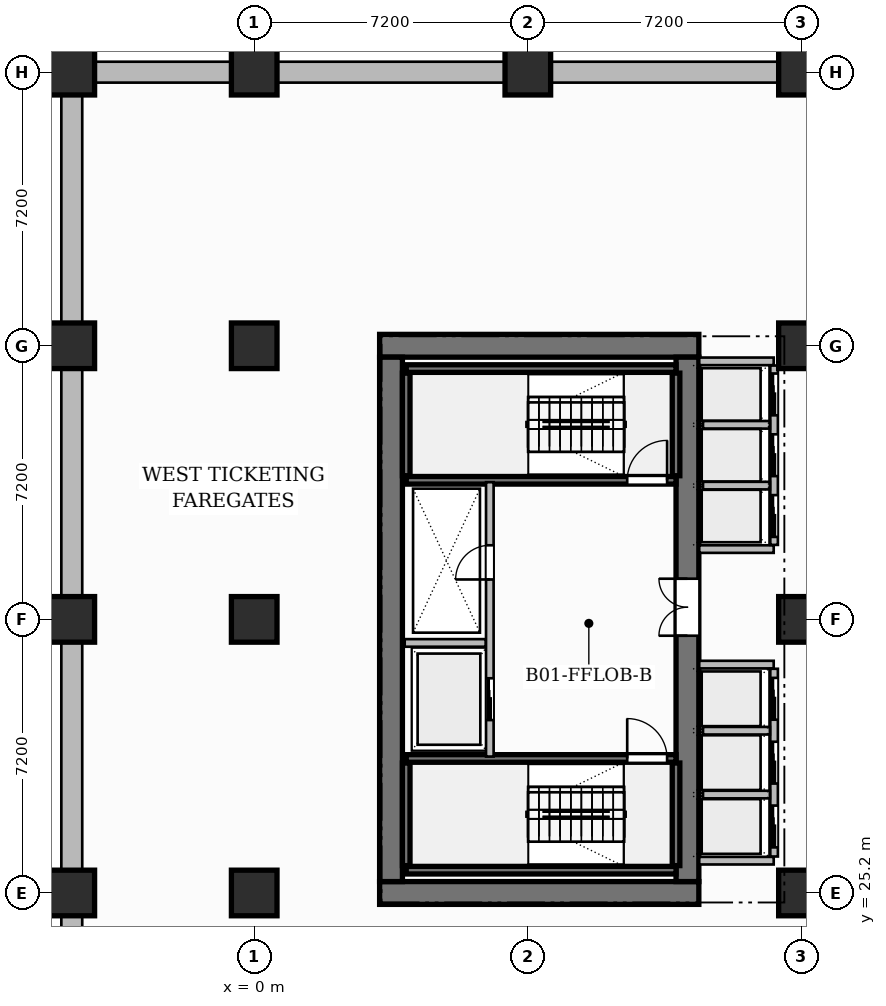
"""IFC4 building model, lengths in metres.
Left out: names, types, materials, properties, quantities, classifications, styles, units other than length and angle.
Written with IfcOpenShell. Run it as: python <this file> out.ifc"""

import sys

from ifc_helpers import new_model, si_unit, direction, frame, frame_2d, origin, origin_2d, place, context, subcontext, project, spatial, rectangle, extrude, source, transform, mapped, element, fill, save


model = new_model("IFC4")
c1 = context("Model", 3, precision=1e-05, world=origin(), true_north=direction((0.0, 1.0)))
c2 = subcontext(c1, "Body", "Model", "MODEL_VIEW")
j1 = project(units=[si_unit("LENGTHUNIT", "METRE"), si_unit("PLANEANGLEUNIT", "RADIAN")], contexts=[c1])
p1 = place(None, origin())
s1 = spatial("IfcSite", under=j1, at=p1, CompositionType="ELEMENT")
p2 = place(p1, origin())
s2 = spatial("IfcBuilding", under=s1, at=p2, CompositionType="ELEMENT")
p3 = place(p2, frame((0.0, 0.0, -6.5)))
s3 = spatial("IfcBuildingStorey", under=s2, at=p3, CompositionType="ELEMENT", Elevation=-6.5)
p4 = place(p3, frame((80.4, 46.8, 0.0), z_axis=(0.0, 0.0, 1.0), x_axis=(-1.0, 0.0, 0.0)))
e1 = element("IfcWall", 1, at=p4, inside=s3, PredefinedType="USERDEFINED", context=c2, shape_type="SweptSolid", body=[
    extrude(rectangle(XDim=85.2, YDim=0.55, at=frame_2d((42.6, 0.0))), origin(), (0.0, 0.0, 1.0), 6.5),
])
p5 = place(p3, frame((-4.8, 46.45, 0.0), z_axis=(0.0, 0.0, 1.0), x_axis=(0.0, -1.0, 0.0)))
e2 = element("IfcWall", 2, at=p5, inside=s3, PredefinedType="USERDEFINED", context=c2, shape_type="SweptSolid", body=[
    extrude(rectangle(XDim=46.1, YDim=0.55, at=frame_2d((23.05, 0.0))), origin(), (0.0, 0.0, 1.0), 6.5),
])
for number, where, z_axis, x_axis in (
    (3, (3.3, 25.2, 0.0), (0.0, 0.0, 1.0), (1.0, 0.0, 0.0)),
    (4, (3.3, 39.6, 0.0), (0.0, 0.0, 1.0), (1.0, 0.0, 0.0)),
):
    element("IfcWall", number, at=place(p3, frame(where, z_axis=z_axis, x_axis=x_axis)), inside=s3, PredefinedType="SHEAR", context=c2, shape_type="SweptSolid", body=[
        extrude(rectangle(XDim=8.4, YDim=0.6, at=frame_2d((4.2, 0.0))), origin(), (0.0, 0.0, 1.0), 6.5),
    ])
p6 = place(p3, frame((3.6, 25.5, 0.0), z_axis=(0.0, 0.0, 1.0), x_axis=(0.0, 1.0, 0.0)))
e5 = element("IfcWall", 5, at=p6, inside=s3, PredefinedType="SHEAR", context=c2, shape_type="SweptSolid", body=[
    extrude(rectangle(XDim=13.8, YDim=0.6, at=frame_2d((6.9, 0.0))), origin(), (0.0, 0.0, 1.0), 6.5),
])
p7 = place(p3, frame((11.4, 25.5, 0.0), z_axis=(0.0, 0.0, 1.0), x_axis=(0.0, 1.0, 0.0)))
e6 = element("IfcWall", 6, at=p7, inside=s3, PredefinedType="SHEAR", context=c2, shape_type="SweptSolid", body=[
    extrude(rectangle(XDim=13.8, YDim=0.6, at=frame_2d((6.9, 0.0))), origin(), (0.0, 0.0, 1.0), 6.5),
])
p8 = place(p7, frame((6.47, 0.0, 0.0)))
e7 = element("IfcOpeningElement", 7, at=p8, cuts=e6, PredefinedType="OPENING", context=c2, shape_type="SweptSolid", body=[
    extrude(rectangle(XDim=1.5, YDim=2.2, at=frame_2d((0.75, 1.1))), frame((0.0, 0.31, 0.0), z_axis=(0.0, -1.0, 0.0), x_axis=(1.0, 0.0, 0.0)), (0.0, 0.0, 1.0), 0.62),
])
m1 = source(origin(), c2, "Body", "SweptSolid", [
    extrude(rectangle(XDim=1.2, YDim=1.2, at=origin_2d()), origin(), (0.0, 0.0, 1.0), 6.5),
])
for number, where, z_axis, x_axis in (
    (8, (-4.8, 25.2, 0.0), (0.0, 0.0, 1.0), (1.0, 0.0, 0.0)),
    (9, (-4.8, 32.4, 0.0), (0.0, 0.0, 1.0), (1.0, 0.0, 0.0)),
    (10, (-4.8, 39.6, 0.0), (0.0, 0.0, 1.0), (1.0, 0.0, 0.0)),
    (11, (-4.8, 46.8, 0.0), (0.0, 0.0, 1.0), (1.0, 0.0, 0.0)),
    (12, (0.0, 25.2, 0.0), (0.0, 0.0, 1.0), (1.0, 0.0, 0.0)),
    (13, (0.0, 32.4, 0.0), (0.0, 0.0, 1.0), (1.0, 0.0, 0.0)),
    (14, (0.0, 39.6, 0.0), (0.0, 0.0, 1.0), (1.0, 0.0, 0.0)),
    (15, (0.0, 46.8, 0.0), (0.0, 0.0, 1.0), (1.0, 0.0, 0.0)),
    (16, (7.2, 46.8, 0.0), (0.0, 0.0, 1.0), (1.0, 0.0, 0.0)),
    (17, (14.4, 25.2, 0.0), (0.0, 0.0, 1.0), (1.0, 0.0, 0.0)),
    (18, (14.4, 32.4, 0.0), (0.0, 0.0, 1.0), (1.0, 0.0, 0.0)),
    (19, (14.4, 39.6, 0.0), (0.0, 0.0, 1.0), (1.0, 0.0, 0.0)),
    (20, (14.4, 46.8, 0.0), (0.0, 0.0, 1.0), (1.0, 0.0, 0.0)),
):
    element("IfcColumn", number, at=place(p3, frame(where, z_axis=z_axis, x_axis=x_axis)), inside=s3, PredefinedType="COLUMN", context=c2, shape_type="MappedRepresentation", body=[
        mapped(m1, transform((0.0, 0.0, 0.0), scale=1.0)),
    ])
p9 = place(p3, frame((4.0, 25.8, 0.0), z_axis=(0.0, 0.0, 1.0), x_axis=(1.0, 0.0, 0.0)))
e21 = element("IfcWall", 21, at=p9, inside=s3, PredefinedType="SHEAR", context=c2, shape_type="SweptSolid", body=[
    extrude(rectangle(XDim=7.1, YDim=0.2, at=frame_2d((3.55, 0.0))), origin(), (0.0, 0.0, 1.0), 6.5),
])
for number, where, z_axis, x_axis in (
    (22, (4.0, 25.92, 0.0), (0.0, 0.0, 1.0), (0.0, 1.0, 0.0)),
    (23, (11.1, 25.92, 0.0), (0.0, 0.0, 1.0), (0.0, 1.0, 0.0)),
):
    element("IfcWall", number, at=place(p3, frame(where, z_axis=z_axis, x_axis=x_axis)), inside=s3, PredefinedType="SHEAR", context=c2, shape_type="SweptSolid", body=[
        extrude(rectangle(XDim=2.7, YDim=0.2, at=frame_2d((1.35, 0.0))), origin(), (0.0, 0.0, 1.0), 6.5),
    ])
p10 = place(p3, frame((4.0, 28.74, 0.0), z_axis=(0.0, 0.0, 1.0), x_axis=(1.0, 0.0, 0.0)))
e24 = element("IfcWall", 24, at=p10, inside=s3, PredefinedType="SHEAR", context=c2, shape_type="SweptSolid", body=[
    extrude(rectangle(XDim=7.1, YDim=0.2, at=frame_2d((3.55, 0.0))), origin(), (0.0, 0.0, 1.0), 6.5),
])
p11 = place(p10, frame((5.815, 0.0, 0.0)))
e25 = element("IfcOpeningElement", 25, at=p11, cuts=e24, PredefinedType="OPENING", context=c2, shape_type="SweptSolid", body=[
    extrude(rectangle(XDim=1.05, YDim=2.2, at=frame_2d((0.525, 1.1))), frame((0.0, 0.11, 0.0), z_axis=(0.0, -1.0, 0.0), x_axis=(1.0, 0.0, 0.0)), (0.0, 0.0, 1.0), 0.22),
])
p12 = place(p3, frame((4.0, 39.0, 0.0), z_axis=(0.0, 0.0, 1.0), x_axis=(1.0, 0.0, 0.0)))
e26 = element("IfcWall", 26, at=p12, inside=s3, PredefinedType="SHEAR", context=c2, shape_type="SweptSolid", body=[
    extrude(rectangle(XDim=7.1, YDim=0.2, at=frame_2d((3.55, 0.0))), origin(), (0.0, 0.0, 1.0), 6.5),
])
for number, where, z_axis, x_axis in (
    (27, (4.0, 36.18, 0.0), (0.0, 0.0, 1.0), (0.0, 1.0, 0.0)),
    (28, (11.1, 36.18, 0.0), (0.0, 0.0, 1.0), (0.0, 1.0, 0.0)),
):
    element("IfcWall", number, at=place(p3, frame(where, z_axis=z_axis, x_axis=x_axis)), inside=s3, PredefinedType="SHEAR", context=c2, shape_type="SweptSolid", body=[
        extrude(rectangle(XDim=2.7, YDim=0.2, at=frame_2d((1.35, 0.0))), origin(), (0.0, 0.0, 1.0), 6.5),
    ])
p13 = place(p3, frame((4.0, 36.06, 0.0), z_axis=(0.0, 0.0, 1.0), x_axis=(1.0, 0.0, 0.0)))
e29 = element("IfcWall", 29, at=p13, inside=s3, PredefinedType="SHEAR", context=c2, shape_type="SweptSolid", body=[
    extrude(rectangle(XDim=7.1, YDim=0.2, at=frame_2d((3.55, 0.0))), origin(), (0.0, 0.0, 1.0), 6.5),
])
p14 = place(p13, frame((5.815, 0.0, 0.0)))
e30 = element("IfcOpeningElement", 30, at=p14, cuts=e29, PredefinedType="OPENING", context=c2, shape_type="SweptSolid", body=[
    extrude(rectangle(XDim=1.05, YDim=2.2, at=frame_2d((0.525, 1.1))), frame((0.0, 0.11, 0.0), z_axis=(0.0, -1.0, 0.0), x_axis=(1.0, 0.0, 0.0)), (0.0, 0.0, 1.0), 0.22),
])
p15 = place(p3, frame((6.2, 28.79, 0.0), z_axis=(0.0, 0.0, 1.0), x_axis=(0.0, 1.0, 0.0)))
e31 = element("IfcWall", 31, at=p15, inside=s3, PredefinedType="PARTITIONING", context=c2, shape_type="SweptSolid", body=[
    extrude(rectangle(XDim=7.22, YDim=0.2, at=frame_2d((3.61, 0.0))), origin(), (0.0, 0.0, 1.0), 6.1),
])
p16 = place(p15, frame((4.66, 0.0, 0.0)))
e32 = element("IfcOpeningElement", 32, at=p16, cuts=e31, PredefinedType="OPENING", context=c2, shape_type="SweptSolid", body=[
    extrude(rectangle(XDim=0.9, YDim=2.1, at=frame_2d((0.45, 1.05))), frame((0.0, 0.11, 0.0), z_axis=(0.0, -1.0, 0.0), x_axis=(1.0, 0.0, 0.0)), (0.0, 0.0, 1.0), 0.22),
])
p17 = place(p15, frame((0.96, 0.0, 0.0)))
e33 = element("IfcOpeningElement", 33, at=p17, cuts=e31, PredefinedType="OPENING", context=c2, shape_type="SweptSolid", body=[
    extrude(rectangle(XDim=1.1, YDim=2.2, at=frame_2d((0.55, 1.1))), frame((0.0, 0.11, 0.0), z_axis=(0.0, -1.0, 0.0), x_axis=(1.0, 0.0, 0.0)), (0.0, 0.0, 1.0), 0.22),
])
p18 = place(p3, frame((3.96, 31.78, 0.0), z_axis=(0.0, 0.0, 1.0), x_axis=(1.0, 0.0, 0.0)))
e34 = element("IfcWall", 34, at=p18, inside=s3, PredefinedType="PARTITIONING", context=c2, shape_type="SweptSolid", body=[
    extrude(rectangle(XDim=2.13, YDim=0.2, at=frame_2d((1.065, 0.0))), origin(), (0.0, 0.0, 1.0), 6.1),
])
for number, where, z_axis, x_axis in (
    (35, (11.71, 26.05, 0.0), (0.0, 0.0, 1.0), (1.0, 0.0, 0.0)),
    (36, (11.71, 31.21, 0.0), (0.0, 0.0, 1.0), (1.0, 0.0, 0.0)),
):
    element("IfcWall", number, at=place(p3, frame(where, z_axis=z_axis, x_axis=x_axis)), inside=s3, PredefinedType="PARTITIONING", context=c2, shape_type="SweptSolid", body=[
        extrude(rectangle(XDim=1.96, YDim=0.2, at=frame_2d((0.98, 0.0))), origin(), (0.0, 0.0, 1.0), 6.1),
    ])
p19 = place(p3, frame((13.68, 26.16, 0.0), z_axis=(0.0, 0.0, 1.0), x_axis=(0.0, 1.0, 0.0)))
e37 = element("IfcWall", 37, at=p19, inside=s3, PredefinedType="PARTITIONING", context=c2, shape_type="SweptSolid", body=[
    extrude(rectangle(XDim=4.94, YDim=0.2, at=frame_2d((2.47, 0.0))), origin(), (0.0, 0.0, 1.0), 6.1),
])
p20 = place(p19, frame((0.24, 0.0, 0.0)))
e38 = element("IfcOpeningElement", 38, at=p20, cuts=e37, PredefinedType="OPENING", context=c2, shape_type="SweptSolid", body=[
    extrude(rectangle(XDim=1.1, YDim=2.2, at=frame_2d((0.55, 1.1))), frame((0.0, 0.11, 0.0), z_axis=(0.0, -1.0, 0.0), x_axis=(1.0, 0.0, 0.0)), (0.0, 0.0, 1.0), 0.22),
])
p21 = place(p19, frame((1.92, 0.0, 0.0)))
e39 = element("IfcOpeningElement", 39, at=p21, cuts=e37, PredefinedType="OPENING", context=c2, shape_type="SweptSolid", body=[
    extrude(rectangle(XDim=1.1, YDim=2.2, at=frame_2d((0.55, 1.1))), frame((0.0, 0.11, 0.0), z_axis=(0.0, -1.0, 0.0), x_axis=(1.0, 0.0, 0.0)), (0.0, 0.0, 1.0), 0.22),
])
p22 = place(p19, frame((3.6, 0.0, 0.0)))
e40 = element("IfcOpeningElement", 40, at=p22, cuts=e37, PredefinedType="OPENING", context=c2, shape_type="SweptSolid", body=[
    extrude(rectangle(XDim=1.1, YDim=2.2, at=frame_2d((0.55, 1.1))), frame((0.0, 0.11, 0.0), z_axis=(0.0, -1.0, 0.0), x_axis=(1.0, 0.0, 0.0)), (0.0, 0.0, 1.0), 0.22),
])
for number, where, z_axis, x_axis in (
    (41, (11.81, 27.79, 0.0), (0.0, 0.0, 1.0), (1.0, 0.0, 0.0)),
    (42, (11.81, 29.47, 0.0), (0.0, 0.0, 1.0), (1.0, 0.0, 0.0)),
):
    element("IfcWall", number, at=place(p3, frame(where, z_axis=z_axis, x_axis=x_axis)), inside=s3, PredefinedType="PARTITIONING", context=c2, shape_type="SweptSolid", body=[
        extrude(rectangle(XDim=1.76, YDim=0.2, at=frame_2d((0.88, 0.0))), origin(), (0.0, 0.0, 1.0), 6.1),
    ])
p23 = place(p3, frame((11.71, 34.25, 0.0), z_axis=(0.0, 0.0, 1.0), x_axis=(1.0, 0.0, 0.0)))
e43 = element("IfcWall", 43, at=p23, inside=s3, PredefinedType="PARTITIONING", context=c2, shape_type="SweptSolid", body=[
    extrude(rectangle(XDim=1.96, YDim=0.2, at=frame_2d((0.98, 0.0))), origin(), (0.0, 0.0, 1.0), 6.1),
])
p24 = place(p3, frame((11.71, 39.19, 0.0), z_axis=(0.0, 0.0, 1.0), x_axis=(1.0, 0.0, 0.0)))
e44 = element("IfcWall", 44, at=p24, inside=s3, PredefinedType="PARTITIONING", context=c2, shape_type="SweptSolid", body=[
    extrude(rectangle(XDim=1.96, YDim=0.2, at=frame_2d((0.98, 0.0))), origin(), (0.0, 0.0, 1.0), 5.185),
])
p25 = place(p3, frame((13.68, 34.36, 0.0), z_axis=(0.0, 0.0, 1.0), x_axis=(0.0, 1.0, 0.0)))
e45 = element("IfcWall", 45, at=p25, inside=s3, PredefinedType="PARTITIONING", context=c2, shape_type="SweptSolid", body=[
    extrude(rectangle(XDim=4.72, YDim=0.2, at=frame_2d((2.36, 0.0))), origin(), (0.0, 0.0, 1.0), 6.1),
])
p26 = place(p25, frame((0.21, 0.0, 0.0)))
e46 = element("IfcOpeningElement", 46, at=p26, cuts=e45, PredefinedType="OPENING", context=c2, shape_type="SweptSolid", body=[
    extrude(rectangle(XDim=1.1, YDim=2.2, at=frame_2d((0.55, 1.1))), frame((0.0, 0.11, 0.0), z_axis=(0.0, -1.0, 0.0), x_axis=(1.0, 0.0, 0.0)), (0.0, 0.0, 1.0), 0.22),
])
p27 = place(p25, frame((1.81, 0.0, 0.0)))
e47 = element("IfcOpeningElement", 47, at=p27, cuts=e45, PredefinedType="OPENING", context=c2, shape_type="SweptSolid", body=[
    extrude(rectangle(XDim=1.1, YDim=2.2, at=frame_2d((0.55, 1.1))), frame((0.0, 0.11, 0.0), z_axis=(0.0, -1.0, 0.0), x_axis=(1.0, 0.0, 0.0)), (0.0, 0.0, 1.0), 0.22),
])
p28 = place(p25, frame((3.41, 0.0, 0.0)))
e48 = element("IfcOpeningElement", 48, at=p28, cuts=e45, PredefinedType="OPENING", context=c2, shape_type="SweptSolid", body=[
    extrude(rectangle(XDim=1.1, YDim=2.2, at=frame_2d((0.55, 1.1))), frame((0.0, 0.11, 0.0), z_axis=(0.0, -1.0, 0.0), x_axis=(1.0, 0.0, 0.0)), (0.0, 0.0, 1.0), 0.22),
])
for number, where, z_axis, x_axis in (
    (49, (11.81, 35.92, 0.0), (0.0, 0.0, 1.0), (1.0, 0.0, 0.0)),
    (50, (11.81, 37.52, 0.0), (0.0, 0.0, 1.0), (1.0, 0.0, 0.0)),
):
    element("IfcWall", number, at=place(p3, frame(where, z_axis=z_axis, x_axis=x_axis)), inside=s3, PredefinedType="PARTITIONING", context=c2, shape_type="SweptSolid", body=[
        extrude(rectangle(XDim=1.76, YDim=0.2, at=frame_2d((0.88, 0.0))), origin(), (0.0, 0.0, 1.0), 6.1),
    ])
p29 = place(p3, frame((13.84, 25.2, 0.0), z_axis=(0.0, 0.0, 1.0), x_axis=(1.0, 0.0, 0.0)))
e51 = element("IfcWall", 51, at=p29, inside=s3, PredefinedType="PARTITIONING", context=c2, shape_type="SweptSolid", body=[
    extrude(rectangle(XDim=66.277, YDim=0.22, at=frame_2d((33.138, 0.0))), origin(), (0.0, 0.0, 1.0), 5.185),
])
p30 = place(p29, frame((11.91, 0.0, 0.0)))
e52 = element("IfcOpeningElement", 52, at=p30, cuts=e51, PredefinedType="OPENING", context=c2, shape_type="SweptSolid", body=[
    extrude(rectangle(XDim=1.5, YDim=2.2, at=frame_2d((0.75, 1.1))), frame((0.0, 0.12, 0.0), z_axis=(0.0, -1.0, 0.0), x_axis=(1.0, 0.0, 0.0)), (0.0, 0.0, 1.0), 0.24),
])
p31 = place(p29, frame((33.41, 0.0, 0.0)))
e53 = element("IfcOpeningElement", 53, at=p31, cuts=e51, PredefinedType="OPENING", context=c2, shape_type="SweptSolid", body=[
    extrude(rectangle(XDim=1.5, YDim=2.2, at=frame_2d((0.75, 1.1))), frame((0.0, 0.12, 0.0), z_axis=(0.0, -1.0, 0.0), x_axis=(1.0, 0.0, 0.0)), (0.0, 0.0, 1.0), 0.24),
])
m2 = source(origin(), c2, "Body", "SweptSolid", [
    extrude(rectangle(XDim=1.05, YDim=2.2, at=frame_2d((0.525, 1.1))), frame((0.0, 0.025, 0.0), z_axis=(0.0, -1.0, 0.0), x_axis=(1.0, 0.0, 0.0)), (0.0, 0.0, 1.0), 0.05),
])
p32 = place(p11, origin())
e54 = element("IfcDoor", 54, at=p32, inside=s3, OperationType="SINGLE_SWING_LEFT", PredefinedType="DOOR", context=c2, shape_type="MappedRepresentation", body=[
    mapped(m2, transform((0.0, 0.0, 0.0), scale=1.0)),
])
fill(e25, e54)
p33 = place(p14, origin())
e55 = element("IfcDoor", 55, at=p33, inside=s3, OperationType="SINGLE_SWING_RIGHT", PredefinedType="DOOR", context=c2, shape_type="MappedRepresentation", body=[
    mapped(m2, transform((0.0, 0.0, 0.0), scale=1.0)),
])
fill(e30, e55)
m3 = source(origin(), c2, "Body", "SweptSolid", [
    extrude(rectangle(XDim=0.9, YDim=2.1, at=frame_2d((0.45, 1.05))), frame((0.0, 0.025, 0.0), z_axis=(0.0, -1.0, 0.0), x_axis=(1.0, 0.0, 0.0)), (0.0, 0.0, 1.0), 0.05),
])
p34 = place(p16, origin())
e56 = element("IfcDoor", 56, at=p34, inside=s3, OperationType="SINGLE_SWING_LEFT", PredefinedType="DOOR", context=c2, shape_type="MappedRepresentation", body=[
    mapped(m3, transform((0.0, 0.0, 0.0), scale=1.0)),
])
fill(e32, e56)
m4 = source(origin(), c2, "Body", "SweptSolid", [
    extrude(rectangle(XDim=1.5, YDim=2.2, at=frame_2d((0.75, 1.1))), frame((0.0, 0.025, 0.0), z_axis=(0.0, -1.0, 0.0), x_axis=(1.0, 0.0, 0.0)), (0.0, 0.0, 1.0), 0.05),
])
p35 = place(p8, origin())
e57 = element("IfcDoor", 57, at=p35, inside=s3, OperationType="DOUBLE_DOOR_SINGLE_SWING", PredefinedType="DOOR", context=c2, shape_type="MappedRepresentation", body=[
    mapped(m4, transform((0.0, 0.0, 0.0), scale=1.0)),
])
fill(e7, e57)
m5 = source(origin(), c2, "Body", "SweptSolid", [
    extrude(rectangle(XDim=1.1, YDim=2.2, at=frame_2d((0.55, 1.1))), frame((0.0, 0.025, 0.0), z_axis=(0.0, -1.0, 0.0), x_axis=(1.0, 0.0, 0.0)), (0.0, 0.0, 1.0), 0.05),
])
p36 = place(p17, origin())
e58 = element("IfcDoor", 58, at=p36, inside=s3, OperationType="SLIDING_TO_LEFT", PredefinedType="DOOR", context=c2, shape_type="MappedRepresentation", body=[
    mapped(m5, transform((0.0, 0.0, 0.0), scale=1.0)),
])
fill(e33, e58)
p37 = place(p20, origin())
e59 = element("IfcDoor", 59, at=p37, inside=s3, OperationType="SLIDING_TO_LEFT", PredefinedType="DOOR", context=c2, shape_type="MappedRepresentation", body=[
    mapped(m5, transform((0.0, 0.0, 0.0), scale=1.0)),
])
fill(e38, e59)
p38 = place(p21, origin())
e60 = element("IfcDoor", 60, at=p38, inside=s3, OperationType="SLIDING_TO_LEFT", PredefinedType="DOOR", context=c2, shape_type="MappedRepresentation", body=[
    mapped(m5, transform((0.0, 0.0, 0.0), scale=1.0)),
])
fill(e39, e60)
p39 = place(p22, origin())
e61 = element("IfcDoor", 61, at=p39, inside=s3, OperationType="SLIDING_TO_LEFT", PredefinedType="DOOR", context=c2, shape_type="MappedRepresentation", body=[
    mapped(m5, transform((0.0, 0.0, 0.0), scale=1.0)),
])
fill(e40, e61)
p40 = place(p26, origin())
e62 = element("IfcDoor", 62, at=p40, inside=s3, OperationType="SLIDING_TO_LEFT", PredefinedType="DOOR", context=c2, shape_type="MappedRepresentation", body=[
    mapped(m5, transform((0.0, 0.0, 0.0), scale=1.0)),
])
fill(e46, e62)
p41 = place(p27, origin())
e63 = element("IfcDoor", 63, at=p41, inside=s3, OperationType="SLIDING_TO_LEFT", PredefinedType="DOOR", context=c2, shape_type="MappedRepresentation", body=[
    mapped(m5, transform((0.0, 0.0, 0.0), scale=1.0)),
])
fill(e47, e63)
p42 = place(p28, origin())
e64 = element("IfcDoor", 64, at=p42, inside=s3, OperationType="SLIDING_TO_LEFT", PredefinedType="DOOR", context=c2, shape_type="MappedRepresentation", body=[
    mapped(m5, transform((0.0, 0.0, 0.0), scale=1.0)),
])
fill(e48, e64)
save(model, sys.argv[1])
